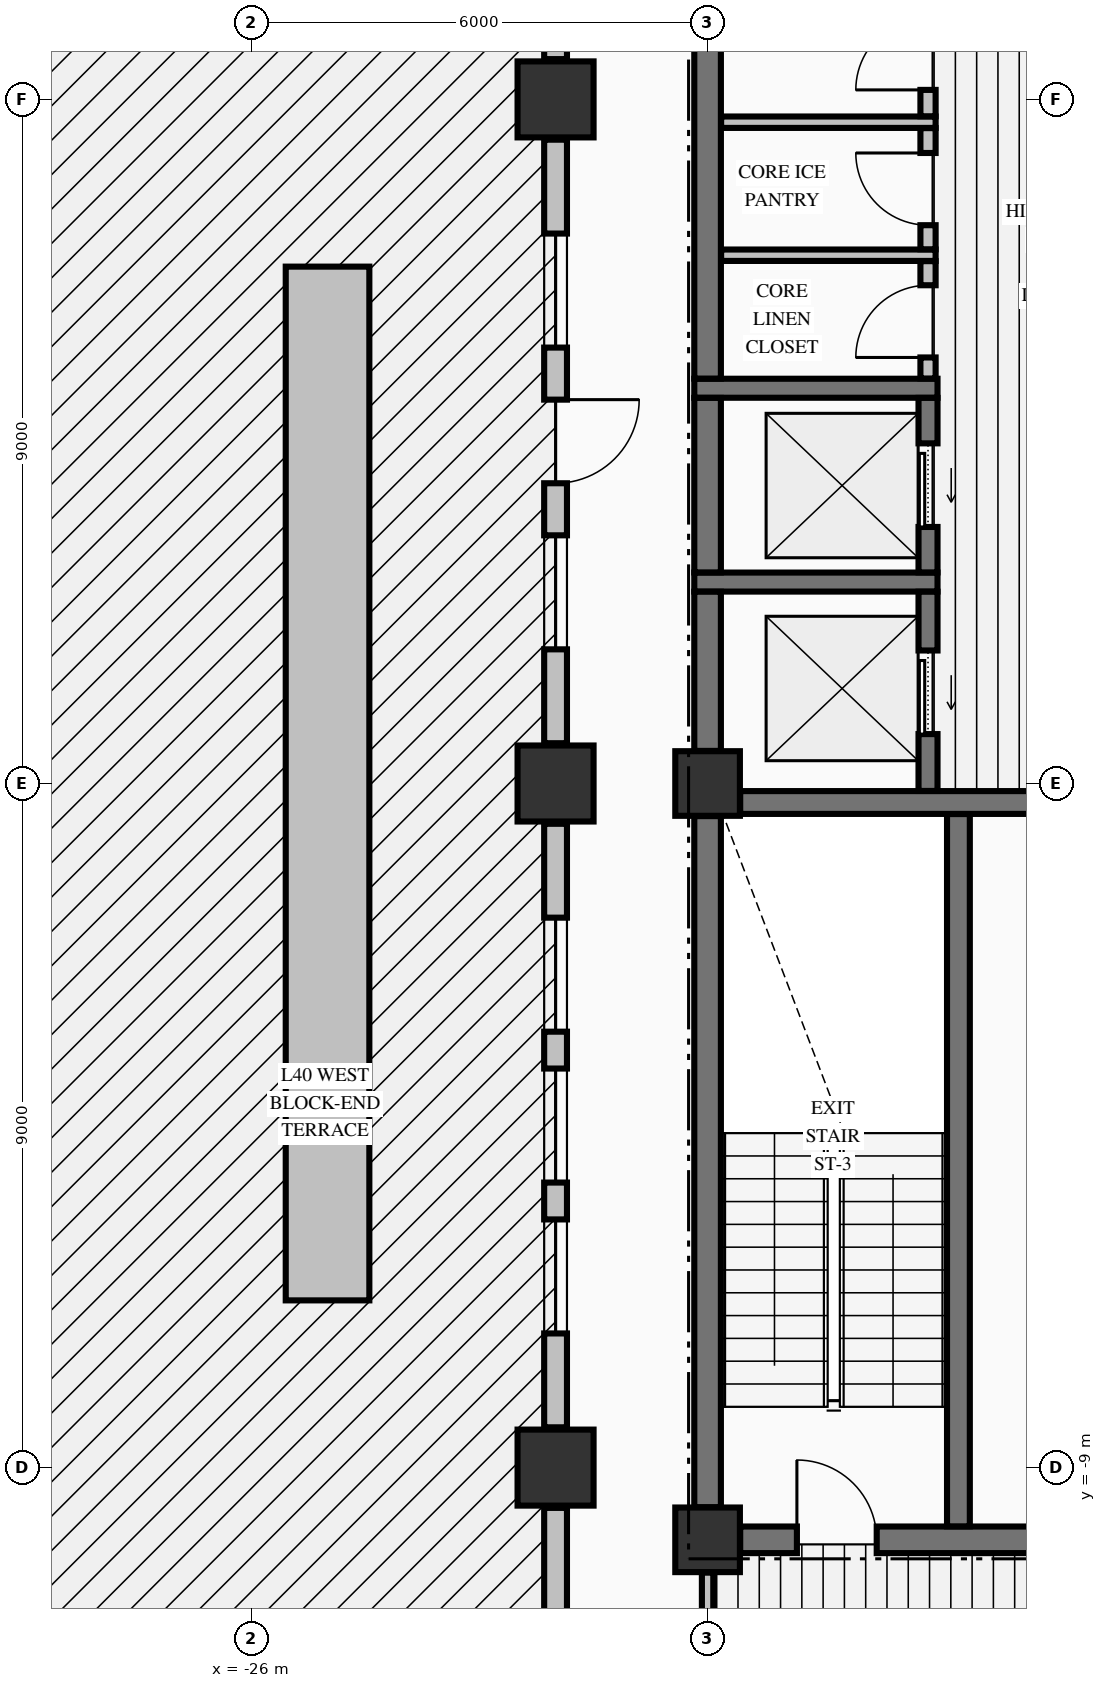
"""IFC4 building model, lengths in metres.
Left out: names, types, materials, properties, quantities, classifications, styles, units other than length and angle.
Written with IfcOpenShell. Run it as: python <this file> out.ifc"""

import sys

from ifc_helpers import new_model, si_unit, direction, frame, frame_2d, origin, origin_2d, place, context, subcontext, project, spatial, rectangle, extrude, element, fill, save


model = new_model("IFC4")
c1 = context("Model", 3, precision=1e-05, world=origin(), true_north=direction((0.0, 1.0)))
c2 = subcontext(c1, "Body", "Model", "MODEL_VIEW")
j1 = project(units=[si_unit("LENGTHUNIT", "METRE"), si_unit("PLANEANGLEUNIT", "RADIAN")], contexts=[c1])
p1 = place(None, origin())
s1 = spatial("IfcSite", under=j1, at=p1, CompositionType="ELEMENT")
p2 = place(p1, origin())
s2 = spatial("IfcBuilding", under=s1, at=p2, CompositionType="ELEMENT")
p3 = place(p2, frame((0.0, 0.0, 158.24)))
s3 = spatial("IfcBuildingStorey", under=s2, at=p3, CompositionType="ELEMENT", Elevation=158.24)
for number, where, z_axis, x_axis in (
    (1, (-22.0, -9.0, -0.425), (0.0, 0.0, 1.0), (1.0, 0.0, 0.0)),
    (2, (-22.0, 0.0, -0.425), (0.0, 0.0, 1.0), (1.0, 0.0, 0.0)),
    (3, (-22.0, 9.0, -0.425), (0.0, 0.0, 1.0), (1.0, 0.0, 0.0)),
):
    element("IfcColumn", number, at=place(p3, frame(where, z_axis=z_axis, x_axis=x_axis)), inside=s3, PredefinedType="COLUMN", context=c2, shape_type="SweptSolid", body=[
        extrude(rectangle(XDim=1.0, YDim=1.0, at=origin_2d()), origin(), (0.0, 0.0, 1.0), 4.595),
    ])
for number, where, z_axis, x_axis in (
    (4, (-20.0, -9.95, -0.425), (0.0, 0.0, 1.0), (1.0, 0.0, 0.0)),
    (5, (-20.0, 0.0, -0.425), (0.0, 0.0, 1.0), (1.0, 0.0, 0.0)),
):
    element("IfcColumn", number, at=place(p3, frame(where, z_axis=z_axis, x_axis=x_axis)), inside=s3, PredefinedType="COLUMN", context=c2, shape_type="SweptSolid", body=[
        extrude(rectangle(XDim=0.85, YDim=0.85, at=origin_2d()), origin(), (0.0, 0.0, 1.0), 4.595),
    ])
p4 = place(p3, frame((-22.0, -9.53, 0.0), z_axis=(0.0, 0.0, 1.0), x_axis=(0.0, -1.0, 0.0)))
e6 = element("IfcWall", 6, at=p4, inside=s3, PredefinedType="STANDARD", context=c2, shape_type="SweptSolid", body=[
    extrude(rectangle(XDim=9.44, YDim=0.3, at=frame_2d((4.72, 0.0))), origin(), (0.0, 0.0, 1.0), 3.562),
])
p5 = place(p3, frame((-22.0, -0.53, 0.0), z_axis=(0.0, 0.0, 1.0), x_axis=(0.0, -1.0, 0.0)))
e7 = element("IfcWall", 7, at=p5, inside=s3, PredefinedType="STANDARD", context=c2, shape_type="SweptSolid", body=[
    extrude(rectangle(XDim=7.94, YDim=0.3, at=frame_2d((3.97, 0.0))), origin(), (0.0, 0.0, 1.0), 3.562),
])
p6 = place(p5, frame((1.235, 0.0, 0.72)))
e8 = element("IfcOpeningElement", 8, at=p6, cuts=e7, PredefinedType="OPENING", context=c2, shape_type="SweptSolid", body=[
    extrude(rectangle(XDim=1.5, YDim=1.6, at=frame_2d((0.75, 0.8))), frame((0.0, 0.16, 0.0), z_axis=(0.0, -1.0, 0.0), x_axis=(1.0, 0.0, 0.0)), (0.0, 0.0, 1.0), 0.32),
])
p7 = place(p5, frame((3.22, 0.0, 0.72)))
e9 = element("IfcOpeningElement", 9, at=p7, cuts=e7, PredefinedType="OPENING", context=c2, shape_type="SweptSolid", body=[
    extrude(rectangle(XDim=1.5, YDim=1.6, at=frame_2d((0.75, 0.8))), frame((0.0, 0.16, 0.0), z_axis=(0.0, -1.0, 0.0), x_axis=(1.0, 0.0, 0.0)), (0.0, 0.0, 1.0), 0.32),
])
p8 = place(p5, frame((5.205, 0.0, 0.72)))
e10 = element("IfcOpeningElement", 10, at=p8, cuts=e7, PredefinedType="OPENING", context=c2, shape_type="SweptSolid", body=[
    extrude(rectangle(XDim=1.5, YDim=1.6, at=frame_2d((0.75, 0.8))), frame((0.0, 0.16, 0.0), z_axis=(0.0, -1.0, 0.0), x_axis=(1.0, 0.0, 0.0)), (0.0, 0.0, 1.0), 0.32),
])
p9 = place(p3, frame((-22.0, 8.47, 0.0), z_axis=(0.0, 0.0, 1.0), x_axis=(0.0, -1.0, 0.0)))
e11 = element("IfcWall", 11, at=p9, inside=s3, PredefinedType="STANDARD", context=c2, shape_type="SweptSolid", body=[
    extrude(rectangle(XDim=7.94, YDim=0.3, at=frame_2d((3.97, 0.0))), origin(), (0.0, 0.0, 1.0), 3.562),
])
p10 = place(p9, frame((3.42, 0.0, 0.0)))
e12 = element("IfcOpeningElement", 12, at=p10, cuts=e11, PredefinedType="OPENING", context=c2, shape_type="SweptSolid", body=[
    extrude(rectangle(XDim=1.1, YDim=2.15, at=frame_2d((0.55, 1.075))), frame((0.0, 0.16, 0.0), z_axis=(0.0, -1.0, 0.0), x_axis=(1.0, 0.0, 0.0)), (0.0, 0.0, 1.0), 0.32),
])
p11 = place(p9, frame((1.235, 0.0, 0.72)))
e13 = element("IfcOpeningElement", 13, at=p11, cuts=e11, PredefinedType="OPENING", context=c2, shape_type="SweptSolid", body=[
    extrude(rectangle(XDim=1.5, YDim=1.6, at=frame_2d((0.75, 0.8))), frame((0.0, 0.16, 0.0), z_axis=(0.0, -1.0, 0.0), x_axis=(1.0, 0.0, 0.0)), (0.0, 0.0, 1.0), 0.32),
])
p12 = place(p9, frame((5.205, 0.0, 0.72)))
e14 = element("IfcOpeningElement", 14, at=p12, cuts=e11, PredefinedType="OPENING", context=c2, shape_type="SweptSolid", body=[
    extrude(rectangle(XDim=1.5, YDim=1.6, at=frame_2d((0.75, 0.8))), frame((0.0, 0.16, 0.0), z_axis=(0.0, -1.0, 0.0), x_axis=(1.0, 0.0, 0.0)), (0.0, 0.0, 1.0), 0.32),
])
p13 = place(p3, frame((-22.0, 18.97, 0.0), z_axis=(0.0, 0.0, 1.0), x_axis=(0.0, -1.0, 0.0)))
e15 = element("IfcWall", 15, at=p13, inside=s3, PredefinedType="STANDARD", context=c2, shape_type="SweptSolid", body=[
    extrude(rectangle(XDim=9.44, YDim=0.3, at=frame_2d((4.72, 0.0))), origin(), (0.0, 0.0, 1.0), 3.562),
])
p14 = place(p3, frame((-19.571, -9.95, 0.0), z_axis=(0.0, 0.0, 1.0), x_axis=(1.0, 0.0, 0.0)))
e16 = element("IfcWall", 16, at=p14, inside=s3, PredefinedType="SHEAR", context=c2, shape_type="SweptSolid", body=[
    extrude(rectangle(XDim=4.871, YDim=0.35, at=frame_2d((2.436, 0.0))), origin(), (0.0, 0.0, 1.0), 4.17),
])
p15 = place(p14, frame((0.746, 0.0, 0.0)))
e17 = element("IfcOpeningElement", 17, at=p15, cuts=e16, PredefinedType="OPENING", context=c2, shape_type="SweptSolid", body=[
    extrude(rectangle(XDim=1.05, YDim=2.15, at=frame_2d((0.525, 1.075))), frame((0.0, 0.185, 0.0), z_axis=(0.0, -1.0, 0.0), x_axis=(1.0, 0.0, 0.0)), (0.0, 0.0, 1.0), 0.37),
])
p16 = place(p3, frame((-19.571, -0.25, 0.0), z_axis=(0.0, 0.0, 1.0), x_axis=(1.0, 0.0, 0.0)))
e18 = element("IfcWall", 18, at=p16, inside=s3, PredefinedType="SHEAR", context=c2, shape_type="SweptSolid", body=[
    extrude(rectangle(XDim=8.142, YDim=0.3, at=frame_2d((4.071, 0.0))), origin(), (0.0, 0.0, 1.0), 4.17),
])
p17 = place(p16, frame((5.871, 0.0, 0.0)))
e19 = element("IfcOpeningElement", 19, at=p17, cuts=e18, PredefinedType="OPENING", context=c2, shape_type="SweptSolid", body=[
    extrude(rectangle(XDim=1.1, YDim=2.15, at=frame_2d((0.55, 1.075))), frame((0.0, 0.16, 0.0), z_axis=(0.0, -1.0, 0.0), x_axis=(1.0, 0.0, 0.0)), (0.0, 0.0, 1.0), 0.32),
])
for number, where, z_axis, x_axis in (
    (20, (-20.175, 2.65, 0.0), (0.0, 0.0, 1.0), (1.0, 0.0, 0.0)),
    (21, (-20.175, 5.2, 0.0), (0.0, 0.0, 1.0), (1.0, 0.0, 0.0)),
):
    element("IfcWall", number, at=place(p3, frame(where, z_axis=z_axis, x_axis=x_axis)), inside=s3, PredefinedType="SOLIDWALL", context=c2, shape_type="SweptSolid", body=[
        extrude(rectangle(XDim=3.2, YDim=0.25, at=frame_2d((1.6, 0.0))), origin(), (0.0, 0.0, 1.0), 4.17),
    ])
for number, where, z_axis, x_axis in (
    (22, (-19.822, 6.95, 0.0), (0.0, 0.0, 1.0), (1.0, 0.0, 0.0)),
    (23, (-19.822, 8.7, 0.0), (0.0, 0.0, 1.0), (1.0, 0.0, 0.0)),
):
    element("IfcWall", number, at=place(p3, frame(where, z_axis=z_axis, x_axis=x_axis)), inside=s3, PredefinedType="PARTITIONING", context=c2, shape_type="SweptSolid", body=[
        extrude(rectangle(XDim=2.822, YDim=0.15, at=frame_2d((1.411, 0.0))), origin(), (0.0, 0.0, 1.0), 4.17),
    ])
p18 = place(p3, frame((-20.0, -9.521, 0.0), z_axis=(0.0, 0.0, 1.0), x_axis=(0.0, 1.0, 0.0)))
e24 = element("IfcWall", 24, at=p18, inside=s3, PredefinedType="SHEAR", context=c2, shape_type="SweptSolid", body=[
    extrude(rectangle(XDim=9.092, YDim=0.35, at=frame_2d((4.546, 0.0))), origin(), (0.0, 0.0, 1.0), 4.17),
])
p19 = place(p3, frame((-20.0, 0.429, 0.0), z_axis=(0.0, 0.0, 1.0), x_axis=(0.0, 1.0, 0.0)))
e25 = element("IfcWall", 25, at=p19, inside=s3, PredefinedType="SHEAR", context=c2, shape_type="SweptSolid", body=[
    extrude(rectangle(XDim=2.094, YDim=0.35, at=frame_2d((1.047, 0.0))), origin(), (0.0, 0.0, 1.0), 4.17),
])
p20 = place(p3, frame((-20.0, 2.777, 0.0), z_axis=(0.0, 0.0, 1.0), x_axis=(0.0, 1.0, 0.0)))
e26 = element("IfcWall", 26, at=p20, inside=s3, PredefinedType="SHEAR", context=c2, shape_type="SweptSolid", body=[
    extrude(rectangle(XDim=2.296, YDim=0.35, at=frame_2d((1.148, 0.0))), origin(), (0.0, 0.0, 1.0), 4.17),
])
p21 = place(p3, frame((-20.0, 5.327, 0.0), z_axis=(0.0, 0.0, 1.0), x_axis=(0.0, 1.0, 0.0)))
e27 = element("IfcWall", 27, at=p21, inside=s3, PredefinedType="SHEAR", context=c2, shape_type="SweptSolid", body=[
    extrude(rectangle(XDim=4.744, YDim=0.35, at=frame_2d((2.372, 0.0))), origin(), (0.0, 0.0, 1.0), 4.17),
])
p22 = place(p3, frame((-17.1, -0.098, 0.0), z_axis=(0.0, 0.0, 1.0), x_axis=(0.0, 1.0, 0.0)))
e28 = element("IfcWall", 28, at=p22, inside=s3, PredefinedType="SOLIDWALL", context=c2, shape_type="SweptSolid", body=[
    extrude(rectangle(XDim=2.621, YDim=0.25, at=frame_2d((1.311, 0.0))), origin(), (0.0, 0.0, 1.0), 4.17),
])
p23 = place(p22, frame((0.748, 0.0, 0.0)))
e29 = element("IfcOpeningElement", 29, at=p23, cuts=e28, PredefinedType="OPENING", context=c2, shape_type="SweptSolid", body=[
    extrude(rectangle(XDim=1.1, YDim=2.2, at=frame_2d((0.55, 1.1))), frame((0.0, 0.135, 0.0), z_axis=(0.0, -1.0, 0.0), x_axis=(1.0, 0.0, 0.0)), (0.0, 0.0, 1.0), 0.27),
])
p24 = place(p3, frame((-17.1, 2.777, 0.0), z_axis=(0.0, 0.0, 1.0), x_axis=(0.0, 1.0, 0.0)))
e30 = element("IfcWall", 30, at=p24, inside=s3, PredefinedType="SOLIDWALL", context=c2, shape_type="SweptSolid", body=[
    extrude(rectangle(XDim=2.296, YDim=0.25, at=frame_2d((1.148, 0.0))), origin(), (0.0, 0.0, 1.0), 4.17),
])
p25 = place(p24, frame((0.598, 0.0, 0.0)))
e31 = element("IfcOpeningElement", 31, at=p25, cuts=e30, PredefinedType="OPENING", context=c2, shape_type="SweptSolid", body=[
    extrude(rectangle(XDim=1.1, YDim=2.2, at=frame_2d((0.55, 1.1))), frame((0.0, 0.135, 0.0), z_axis=(0.0, -1.0, 0.0), x_axis=(1.0, 0.0, 0.0)), (0.0, 0.0, 1.0), 0.27),
])
p26 = place(p3, frame((-16.7, -9.773, 0.0), z_axis=(0.0, 0.0, 1.0), x_axis=(0.0, 1.0, 0.0)))
e32 = element("IfcWall", 32, at=p26, inside=s3, PredefinedType="SHEAR", context=c2, shape_type="SweptSolid", body=[
    extrude(rectangle(XDim=9.371, YDim=0.3, at=frame_2d((4.686, 0.0))), origin(), (0.0, 0.0, 1.0), 4.17),
])
p27 = place(p3, frame((-20.0, -12.222, 0.0), z_axis=(0.0, 0.0, 1.0), x_axis=(0.0, 1.0, 0.0)))
e33 = element("IfcWall", 33, at=p27, inside=s3, PredefinedType="PARTITIONING", context=c2, shape_type="SweptSolid", body=[
    extrude(rectangle(XDim=1.841, YDim=0.15, at=frame_2d((0.92, 0.0))), origin(), (0.0, 0.0, 1.0), 3.36),
])
p28 = place(p3, frame((-17.1, 5.328, 0.0), z_axis=(0.0, 0.0, 1.0), x_axis=(0.0, 1.0, 0.0)))
e34 = element("IfcWall", 34, at=p28, inside=s3, PredefinedType="PARTITIONING", context=c2, shape_type="SweptSolid", body=[
    extrude(rectangle(XDim=1.544, YDim=0.2, at=frame_2d((0.772, 0.0))), origin(), (0.0, 0.0, 1.0), 4.17),
])
p29 = place(p28, frame((0.277, 0.0, 0.0)))
e35 = element("IfcOpeningElement", 35, at=p29, cuts=e34, PredefinedType="OPENING", context=c2, shape_type="SweptSolid", body=[
    extrude(rectangle(XDim=0.95, YDim=2.15, at=frame_2d((0.475, 1.075))), frame((0.0, 0.11, 0.0), z_axis=(0.0, -1.0, 0.0), x_axis=(1.0, 0.0, 0.0)), (0.0, 0.0, 1.0), 0.22),
])
p30 = place(p3, frame((-17.1, 7.028, 0.0), z_axis=(0.0, 0.0, 1.0), x_axis=(0.0, 1.0, 0.0)))
e36 = element("IfcWall", 36, at=p30, inside=s3, PredefinedType="PARTITIONING", context=c2, shape_type="SweptSolid", body=[
    extrude(rectangle(XDim=1.594, YDim=0.2, at=frame_2d((0.797, 0.0))), origin(), (0.0, 0.0, 1.0), 4.17),
])
p31 = place(p30, frame((0.317, 0.0, 0.0)))
e37 = element("IfcOpeningElement", 37, at=p31, cuts=e36, PredefinedType="OPENING", context=c2, shape_type="SweptSolid", body=[
    extrude(rectangle(XDim=0.95, YDim=2.15, at=frame_2d((0.475, 1.075))), frame((0.0, 0.11, 0.0), z_axis=(0.0, -1.0, 0.0), x_axis=(1.0, 0.0, 0.0)), (0.0, 0.0, 1.0), 0.22),
])
p32 = place(p3, frame((-17.1, 8.778, 0.0), z_axis=(0.0, 0.0, 1.0), x_axis=(0.0, 1.0, 0.0)))
e38 = element("IfcWall", 38, at=p32, inside=s3, PredefinedType="PARTITIONING", context=c2, shape_type="SweptSolid", body=[
    extrude(rectangle(XDim=1.544, YDim=0.2, at=frame_2d((0.772, 0.0))), origin(), (0.0, 0.0, 1.0), 4.17),
])
p33 = place(p32, frame((0.347, 0.0, 0.0)))
e39 = element("IfcOpeningElement", 39, at=p33, cuts=e38, PredefinedType="OPENING", context=c2, shape_type="SweptSolid", body=[
    extrude(rectangle(XDim=0.95, YDim=2.15, at=frame_2d((0.475, 1.075))), frame((0.0, 0.11, 0.0), z_axis=(0.0, -1.0, 0.0), x_axis=(1.0, 0.0, 0.0)), (0.0, 0.0, 1.0), 0.22),
])
p34 = place(p3, frame((-25.0, -6.8, -0.04), z_axis=(0.0, 0.0, 1.0), x_axis=(0.0, 1.0, 0.0)))
e40 = element("IfcWall", 40, at=p34, inside=s3, PredefinedType="PARAPET", context=c2, shape_type="SweptSolid", body=[
    extrude(rectangle(XDim=13.6, YDim=1.1, at=frame_2d((6.8, 0.0))), origin(), (0.0, 0.0, 1.0), 0.6),
])
p35 = place(p6, origin())
e41 = element("IfcWindow", 41, at=p35, inside=s3, PartitioningType="SINGLE_PANEL", PredefinedType="WINDOW", context=c2, shape_type="SweptSolid", body=[
    extrude(rectangle(XDim=1.5, YDim=1.6, at=frame_2d((0.75, 0.8))), frame((0.0, 0.03, 0.0), z_axis=(0.0, -1.0, 0.0), x_axis=(1.0, 0.0, 0.0)), (0.0, 0.0, 1.0), 0.06),
])
fill(e8, e41)
p36 = place(p7, origin())
e42 = element("IfcWindow", 42, at=p36, inside=s3, PartitioningType="SINGLE_PANEL", PredefinedType="WINDOW", context=c2, shape_type="SweptSolid", body=[
    extrude(rectangle(XDim=1.5, YDim=1.6, at=frame_2d((0.75, 0.8))), frame((0.0, 0.03, 0.0), z_axis=(0.0, -1.0, 0.0), x_axis=(1.0, 0.0, 0.0)), (0.0, 0.0, 1.0), 0.06),
])
fill(e9, e42)
p37 = place(p8, origin())
e43 = element("IfcWindow", 43, at=p37, inside=s3, PartitioningType="SINGLE_PANEL", PredefinedType="WINDOW", context=c2, shape_type="SweptSolid", body=[
    extrude(rectangle(XDim=1.5, YDim=1.6, at=frame_2d((0.75, 0.8))), frame((0.0, 0.03, 0.0), z_axis=(0.0, -1.0, 0.0), x_axis=(1.0, 0.0, 0.0)), (0.0, 0.0, 1.0), 0.06),
])
fill(e10, e43)
p38 = place(p10, origin())
e44 = element("IfcDoor", 44, at=p38, inside=s3, OperationType="SINGLE_SWING_LEFT", PredefinedType="DOOR", context=c2, shape_type="SweptSolid", body=[
    extrude(rectangle(XDim=1.1, YDim=2.15, at=frame_2d((0.55, 1.075))), frame((0.0, 0.025, 0.0), z_axis=(0.0, -1.0, 0.0), x_axis=(1.0, 0.0, 0.0)), (0.0, 0.0, 1.0), 0.05),
])
fill(e12, e44)
p39 = place(p11, origin())
e45 = element("IfcWindow", 45, at=p39, inside=s3, PartitioningType="SINGLE_PANEL", PredefinedType="WINDOW", context=c2, shape_type="SweptSolid", body=[
    extrude(rectangle(XDim=1.5, YDim=1.6, at=frame_2d((0.75, 0.8))), frame((0.0, 0.03, 0.0), z_axis=(0.0, -1.0, 0.0), x_axis=(1.0, 0.0, 0.0)), (0.0, 0.0, 1.0), 0.06),
])
fill(e13, e45)
p40 = place(p12, origin())
e46 = element("IfcWindow", 46, at=p40, inside=s3, PartitioningType="SINGLE_PANEL", PredefinedType="WINDOW", context=c2, shape_type="SweptSolid", body=[
    extrude(rectangle(XDim=1.5, YDim=1.6, at=frame_2d((0.75, 0.8))), frame((0.0, 0.03, 0.0), z_axis=(0.0, -1.0, 0.0), x_axis=(1.0, 0.0, 0.0)), (0.0, 0.0, 1.0), 0.06),
])
fill(e14, e46)
p41 = place(p15, origin())
e47 = element("IfcDoor", 47, at=p41, inside=s3, OperationType="SINGLE_SWING_LEFT", PredefinedType="DOOR", context=c2, shape_type="SweptSolid", body=[
    extrude(rectangle(XDim=1.05, YDim=2.15, at=frame_2d((0.525, 1.075))), frame((0.0, 0.025, 0.0), z_axis=(0.0, -1.0, 0.0), x_axis=(1.0, 0.0, 0.0)), (0.0, 0.0, 1.0), 0.05),
])
fill(e17, e47)
p42 = place(p23, origin())
e48 = element("IfcDoor", 48, at=p42, inside=s3, OperationType="SLIDING_TO_LEFT", PredefinedType="DOOR", context=c2, shape_type="SweptSolid", body=[
    extrude(rectangle(XDim=1.1, YDim=2.2, at=frame_2d((0.55, 1.1))), frame((0.0, 0.025, 0.0), z_axis=(0.0, -1.0, 0.0), x_axis=(1.0, 0.0, 0.0)), (0.0, 0.0, 1.0), 0.05),
])
fill(e29, e48)
p43 = place(p25, origin())
e49 = element("IfcDoor", 49, at=p43, inside=s3, OperationType="SLIDING_TO_LEFT", PredefinedType="DOOR", context=c2, shape_type="SweptSolid", body=[
    extrude(rectangle(XDim=1.1, YDim=2.2, at=frame_2d((0.55, 1.1))), frame((0.0, 0.025, 0.0), z_axis=(0.0, -1.0, 0.0), x_axis=(1.0, 0.0, 0.0)), (0.0, 0.0, 1.0), 0.05),
])
fill(e31, e49)
p44 = place(p33, origin())
e50 = element("IfcDoor", 50, at=p44, inside=s3, OperationType="SINGLE_SWING_LEFT", PredefinedType="DOOR", context=c2, shape_type="SweptSolid", body=[
    extrude(rectangle(XDim=0.95, YDim=2.15, at=frame_2d((0.475, 1.075))), frame((0.0, 0.025, 0.0), z_axis=(0.0, -1.0, 0.0), x_axis=(1.0, 0.0, 0.0)), (0.0, 0.0, 1.0), 0.05),
])
fill(e39, e50)
p45 = place(p31, origin())
e51 = element("IfcDoor", 51, at=p45, inside=s3, OperationType="SINGLE_SWING_RIGHT", PredefinedType="DOOR", context=c2, shape_type="SweptSolid", body=[
    extrude(rectangle(XDim=0.95, YDim=2.15, at=frame_2d((0.475, 1.075))), frame((0.0, 0.025, 0.0), z_axis=(0.0, -1.0, 0.0), x_axis=(1.0, 0.0, 0.0)), (0.0, 0.0, 1.0), 0.05),
])
fill(e37, e51)
p46 = place(p29, origin())
e52 = element("IfcDoor", 52, at=p46, inside=s3, OperationType="SINGLE_SWING_LEFT", PredefinedType="DOOR", context=c2, shape_type="SweptSolid", body=[
    extrude(rectangle(XDim=0.95, YDim=2.15, at=frame_2d((0.475, 1.075))), frame((0.0, 0.025, 0.0), z_axis=(0.0, -1.0, 0.0), x_axis=(1.0, 0.0, 0.0)), (0.0, 0.0, 1.0), 0.05),
])
fill(e35, e52)
save(model, sys.argv[1])
